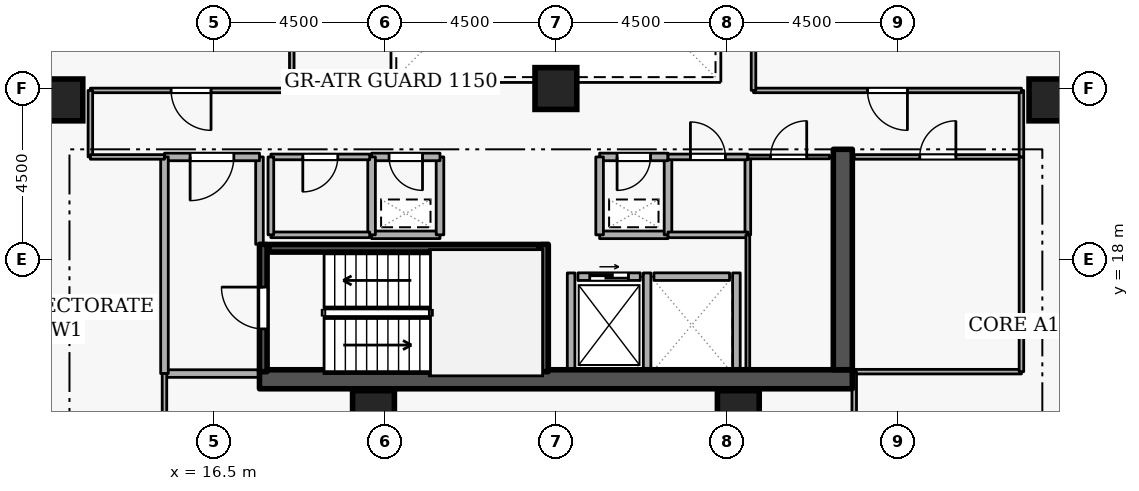
"""IFC4 building model, lengths in metres.
Left out: names, types, materials, properties, quantities, classifications, styles, units other than length and angle.
Written with IfcOpenShell. Run it as: python <this file> out.ifc"""

import sys

from ifc_helpers import new_model, si_unit, direction, frame, frame_2d, origin, origin_2d, place, context, subcontext, project, spatial, rectangle, extrude, element, fill, save


model = new_model("IFC4")
c1 = context("Model", 3, precision=1e-05, world=origin(), true_north=direction((0.0, 1.0)))
c2 = subcontext(c1, "Body", "Model", "MODEL_VIEW")
j1 = project(units=[si_unit("LENGTHUNIT", "METRE"), si_unit("PLANEANGLEUNIT", "RADIAN")], contexts=[c1])
p1 = place(None, origin())
s1 = spatial("IfcSite", under=j1, at=p1, CompositionType="ELEMENT")
p2 = place(p1, origin())
s2 = spatial("IfcBuilding", under=s1, at=p2, CompositionType="ELEMENT")
p3 = place(p2, frame((0.0, 0.0, 152.7)))
s3 = spatial("IfcBuildingStorey", under=s2, at=p3, CompositionType="ELEMENT", Elevation=152.7)
p4 = place(p3, frame((17.7, 14.85, 0.0), z_axis=(0.0, 0.0, 1.0), x_axis=(1.0, 0.0, 0.0)))
e1 = element("IfcWall", 1, at=p4, inside=s3, PredefinedType="SHEAR", context=c2, shape_type="SweptSolid", body=[
    extrude(rectangle(XDim=15.6, YDim=0.5, at=frame_2d((7.8, 0.0))), origin(), (0.0, 0.0, 1.0), 3.6),
])
p5 = place(p3, frame((33.05, 15.1, 0.0), z_axis=(0.0, 0.0, 1.0), x_axis=(0.0, 1.0, 0.0)))
e2 = element("IfcWall", 2, at=p5, inside=s3, PredefinedType="SHEAR", context=c2, shape_type="SweptSolid", body=[
    extrude(rectangle(XDim=5.8, YDim=0.5, at=frame_2d((2.9, 0.0))), origin(), (0.0, 0.0, 1.0), 3.6),
])
for number, where, z_axis, x_axis in (
    (3, (12.5, 22.2, 0.0), (0.0, 0.0, 1.0), (1.0, 0.0, 0.0)),
    (4, (38.5, 22.2, 0.0), (0.0, 0.0, 1.0), (1.0, 0.0, 0.0)),
    (5, (20.7, 14.0, 0.0), (0.0, 0.0, 1.0), (1.0, 0.0, 0.0)),
    (6, (30.3, 14.0, 0.0), (0.0, 0.0, 1.0), (1.0, 0.0, 0.0)),
    (7, (25.5, 22.5, 0.0), (0.0, 0.0, 1.0), (1.0, 0.0, 0.0)),
):
    element("IfcColumn", number, at=place(p3, frame(where, z_axis=z_axis, x_axis=x_axis)), inside=s3, PredefinedType="COLUMN", context=c2, shape_type="SweptSolid", body=[
        extrude(rectangle(XDim=1.1, YDim=1.1, at=origin_2d()), origin(), (0.0, 0.0, 1.0), 3.6),
    ])
p6 = place(p3, frame((26.08, 17.55, 0.0), z_axis=(0.0, 0.0, 1.0), x_axis=(1.0, 0.0, 0.0)))
e8 = element("IfcWall", 8, at=p6, inside=s3, PredefinedType="STANDARD", context=c2, shape_type="SweptSolid", body=[
    extrude(rectangle(XDim=1.64, YDim=0.2, at=frame_2d((0.82, 0.0))), origin(), (0.0, 0.0, 1.0), 3.34),
])
p7 = place(p6, frame((0.31, 0.0, 0.0)))
e9 = element("IfcOpeningElement", 9, at=p7, cuts=e8, PredefinedType="OPENING", context=c2, shape_type="SweptSolid", body=[
    extrude(rectangle(XDim=1.02, YDim=2.06, at=frame_2d((0.51, 1.03))), frame((0.0, 0.11, 0.0), z_axis=(0.0, -1.0, 0.0), x_axis=(1.0, 0.0, 0.0)), (0.0, 0.0, 1.0), 0.22),
])
p8 = place(p3, frame((28.08, 17.55, 0.0), z_axis=(0.0, 0.0, 1.0), x_axis=(1.0, 0.0, 0.0)))
e10 = element("IfcWall", 10, at=p8, inside=s3, PredefinedType="STANDARD", context=c2, shape_type="SweptSolid", body=[
    extrude(rectangle(XDim=1.99, YDim=0.2, at=frame_2d((0.995, 0.0))), origin(), (0.0, 0.0, 1.0), 3.34),
])
for number, where, z_axis, x_axis in (
    (11, (27.9, 15.112, 0.0), (0.0, 0.0, 1.0), (0.0, 1.0, 0.0)),
    (12, (25.9, 15.112, 0.0), (0.0, 0.0, 1.0), (0.0, 1.0, 0.0)),
    (13, (30.25, 15.112, 0.0), (0.0, 0.0, 1.0), (0.0, 1.0, 0.0)),
):
    element("IfcWall", number, at=place(p3, frame(where, z_axis=z_axis, x_axis=x_axis)), inside=s3, PredefinedType="STANDARD", context=c2, shape_type="SweptSolid", body=[
        extrude(rectangle(XDim=2.536, YDim=0.2, at=frame_2d((1.268, 0.0))), origin(), (0.0, 0.0, 1.0), 3.34),
    ])
p9 = place(p3, frame((17.8, 15.05, 0.0), z_axis=(0.0, 0.0, 1.0), x_axis=(0.0, 1.0, 0.0)))
e14 = element("IfcWall", 14, at=p9, inside=s3, PredefinedType="SHEAR", context=c2, shape_type="SweptSolid", body=[
    extrude(rectangle(XDim=3.35, YDim=0.2, at=frame_2d((1.675, 0.0))), origin(), (0.0, 0.0, 1.0), 3.6),
])
p10 = place(p9, frame((1.125, 0.0, 0.0)))
e15 = element("IfcOpeningElement", 15, at=p10, cuts=e14, PredefinedType="OPENING", context=c2, shape_type="SweptSolid", body=[
    extrude(rectangle(XDim=1.1, YDim=2.1, at=frame_2d((0.55, 1.05))), frame((0.0, 0.11, 0.0), z_axis=(0.0, -1.0, 0.0), x_axis=(1.0, 0.0, 0.0)), (0.0, 0.0, 1.0), 0.22),
])
p11 = place(p3, frame((25.2, 18.4, 0.0), z_axis=(0.0, 0.0, 1.0), x_axis=(0.0, -1.0, 0.0)))
e16 = element("IfcWall", 16, at=p11, inside=s3, PredefinedType="SHEAR", context=c2, shape_type="SweptSolid", body=[
    extrude(rectangle(XDim=3.35, YDim=0.2, at=frame_2d((1.675, 0.0))), origin(), (0.0, 0.0, 1.0), 3.6),
])
p12 = place(p3, frame((25.05, 18.297, 0.0), z_axis=(0.0, 0.0, 1.0), x_axis=(-1.0, 0.0, 0.0)))
e17 = element("IfcWall", 17, at=p12, inside=s3, PredefinedType="SHEAR", context=c2, shape_type="SweptSolid", body=[
    extrude(rectangle(XDim=7.1, YDim=0.2, at=frame_2d((3.55, 0.0))), origin(), (0.0, 0.0, 1.0), 3.6),
])
p13 = place(p3, frame((15.2, 15.0, 0.0), z_axis=(0.0, 0.0, 1.0), x_axis=(1.0, 0.0, 0.0)))
e18 = element("IfcWall", 18, at=p13, inside=s3, PredefinedType="STANDARD", context=c2, shape_type="SweptSolid", body=[
    extrude(rectangle(XDim=2.5, YDim=0.2, at=frame_2d((1.25, 0.0))), origin(), (0.0, 0.0, 1.0), 3.34),
])
p14 = place(p3, frame((17.7, 18.4, 0.0), z_axis=(0.0, 0.0, 1.0), x_axis=(0.0, 1.0, 0.0)))
e19 = element("IfcWall", 19, at=p14, inside=s3, PredefinedType="STANDARD", context=c2, shape_type="SweptSolid", body=[
    extrude(rectangle(XDim=2.3, YDim=0.2, at=frame_2d((1.15, 0.0))), origin(), (0.0, 0.0, 1.0), 2.545),
])
p15 = place(p3, frame((17.7, 20.7, 0.0), z_axis=(0.0, 0.0, 1.0), x_axis=(-1.0, 0.0, 0.0)))
e20 = element("IfcWall", 20, at=p15, inside=s3, PredefinedType="STANDARD", context=c2, shape_type="SweptSolid", body=[
    extrude(rectangle(XDim=2.5, YDim=0.2, at=frame_2d((1.25, 0.0))), origin(), (0.0, 0.0, 1.0), 3.34),
])
p16 = place(p15, frame((0.675, 0.0, 0.0)))
e21 = element("IfcOpeningElement", 21, at=p16, cuts=e20, PredefinedType="OPENING", context=c2, shape_type="SweptSolid", body=[
    extrude(rectangle(XDim=1.15, YDim=2.1, at=frame_2d((0.575, 1.05))), frame((0.0, 0.11, 0.0), z_axis=(0.0, -1.0, 0.0), x_axis=(1.0, 0.0, 0.0)), (0.0, 0.0, 1.0), 0.22),
])
p17 = place(p3, frame((15.2, 20.7, 0.0), z_axis=(0.0, 0.0, 1.0), x_axis=(0.0, -1.0, 0.0)))
e22 = element("IfcWall", 22, at=p17, inside=s3, PredefinedType="STANDARD", context=c2, shape_type="SweptSolid", body=[
    extrude(rectangle(XDim=5.7, YDim=0.2, at=frame_2d((2.85, 0.0))), origin(), (0.0, 0.0, 1.0), 3.34),
])
p18 = place(p3, frame((26.65, 18.65, 0.0), z_axis=(0.0, 0.0, 1.0), x_axis=(1.0, 0.0, 0.0)))
e23 = element("IfcWall", 23, at=p18, inside=s3, PredefinedType="STANDARD", context=c2, shape_type="SweptSolid", body=[
    extrude(rectangle(XDim=1.8, YDim=0.2, at=frame_2d((0.9, 0.0))), origin(), (0.0, 0.0, 1.0), 3.34),
])
p19 = place(p3, frame((28.45, 18.65, 0.0), z_axis=(0.0, 0.0, 1.0), x_axis=(0.0, 1.0, 0.0)))
e24 = element("IfcWall", 24, at=p19, inside=s3, PredefinedType="STANDARD", context=c2, shape_type="SweptSolid", body=[
    extrude(rectangle(XDim=2.05, YDim=0.2, at=frame_2d((1.025, 0.0))), origin(), (0.0, 0.0, 1.0), 3.34),
])
p20 = place(p3, frame((28.45, 20.7, 0.0), z_axis=(0.0, 0.0, 1.0), x_axis=(-1.0, 0.0, 0.0)))
e25 = element("IfcWall", 25, at=p20, inside=s3, PredefinedType="STANDARD", context=c2, shape_type="SweptSolid", body=[
    extrude(rectangle(XDim=1.8, YDim=0.2, at=frame_2d((0.9, 0.0))), origin(), (0.0, 0.0, 1.0), 3.34),
])
p21 = place(p20, frame((0.46, 0.0, 0.0)))
e26 = element("IfcOpeningElement", 26, at=p21, cuts=e25, PredefinedType="OPENING", context=c2, shape_type="SweptSolid", body=[
    extrude(rectangle(XDim=0.88, YDim=2.04, at=frame_2d((0.44, 1.02))), frame((0.0, 0.11, 0.0), z_axis=(0.0, -1.0, 0.0), x_axis=(1.0, 0.0, 0.0)), (0.0, 0.0, 1.0), 0.22),
])
p22 = place(p3, frame((26.65, 20.7, 0.0), z_axis=(0.0, 0.0, 1.0), x_axis=(0.0, -1.0, 0.0)))
e27 = element("IfcWall", 27, at=p22, inside=s3, PredefinedType="STANDARD", context=c2, shape_type="SweptSolid", body=[
    extrude(rectangle(XDim=2.05, YDim=0.2, at=frame_2d((1.025, 0.0))), origin(), (0.0, 0.0, 1.0), 3.34),
])
p23 = place(p3, frame((20.65, 18.65, 0.0), z_axis=(0.0, 0.0, 1.0), x_axis=(1.0, 0.0, 0.0)))
e28 = element("IfcWall", 28, at=p23, inside=s3, PredefinedType="STANDARD", context=c2, shape_type="SweptSolid", body=[
    extrude(rectangle(XDim=1.8, YDim=0.2, at=frame_2d((0.9, 0.0))), origin(), (0.0, 0.0, 1.0), 3.34),
])
p24 = place(p3, frame((22.45, 18.65, 0.0), z_axis=(0.0, 0.0, 1.0), x_axis=(0.0, 1.0, 0.0)))
e29 = element("IfcWall", 29, at=p24, inside=s3, PredefinedType="STANDARD", context=c2, shape_type="SweptSolid", body=[
    extrude(rectangle(XDim=2.05, YDim=0.2, at=frame_2d((1.025, 0.0))), origin(), (0.0, 0.0, 1.0), 3.34),
])
p25 = place(p3, frame((22.45, 20.7, 0.0), z_axis=(0.0, 0.0, 1.0), x_axis=(-1.0, 0.0, 0.0)))
e30 = element("IfcWall", 30, at=p25, inside=s3, PredefinedType="STANDARD", context=c2, shape_type="SweptSolid", body=[
    extrude(rectangle(XDim=1.8, YDim=0.2, at=frame_2d((0.9, 0.0))), origin(), (0.0, 0.0, 1.0), 3.34),
])
p26 = place(p25, frame((0.46, 0.0, 0.0)))
e31 = element("IfcOpeningElement", 31, at=p26, cuts=e30, PredefinedType="OPENING", context=c2, shape_type="SweptSolid", body=[
    extrude(rectangle(XDim=0.88, YDim=2.04, at=frame_2d((0.44, 1.02))), frame((0.0, 0.11, 0.0), z_axis=(0.0, -1.0, 0.0), x_axis=(1.0, 0.0, 0.0)), (0.0, 0.0, 1.0), 0.22),
])
p27 = place(p3, frame((20.65, 20.7, 0.0), z_axis=(0.0, 0.0, 1.0), x_axis=(0.0, -1.0, 0.0)))
e32 = element("IfcWall", 32, at=p27, inside=s3, PredefinedType="STANDARD", context=c2, shape_type="SweptSolid", body=[
    extrude(rectangle(XDim=2.05, YDim=0.2, at=frame_2d((1.025, 0.0))), origin(), (0.0, 0.0, 1.0), 3.34),
])
p28 = place(p3, frame((18.0, 18.65, 0.0), z_axis=(0.0, 0.0, 1.0), x_axis=(1.0, 0.0, 0.0)))
e33 = element("IfcWall", 33, at=p28, inside=s3, PredefinedType="PARTITIONING", context=c2, shape_type="SweptSolid", body=[
    extrude(rectangle(XDim=2.6, YDim=0.15, at=frame_2d((1.3, 0.0))), origin(), (0.0, 0.0, 1.0), 3.34),
])
p29 = place(p3, frame((20.6, 20.7, 0.0), z_axis=(0.0, 0.0, 1.0), x_axis=(-1.0, 0.0, 0.0)))
e34 = element("IfcWall", 34, at=p29, inside=s3, PredefinedType="PARTITIONING", context=c2, shape_type="SweptSolid", body=[
    extrude(rectangle(XDim=2.6, YDim=0.15, at=frame_2d((1.3, 0.0))), origin(), (0.0, 0.0, 1.0), 3.34),
])
p30 = place(p29, frame((0.84, 0.0, 0.0)))
e35 = element("IfcOpeningElement", 35, at=p30, cuts=e34, PredefinedType="OPENING", context=c2, shape_type="SweptSolid", body=[
    extrude(rectangle(XDim=0.92, YDim=2.08, at=frame_2d((0.46, 1.04))), frame((0.0, 0.085, 0.0), z_axis=(0.0, -1.0, 0.0), x_axis=(1.0, 0.0, 0.0)), (0.0, 0.0, 1.0), 0.17),
])
p31 = place(p3, frame((18.0, 20.7, 0.0), z_axis=(0.0, 0.0, 1.0), x_axis=(0.0, -1.0, 0.0)))
e36 = element("IfcWall", 36, at=p31, inside=s3, PredefinedType="PARTITIONING", context=c2, shape_type="SweptSolid", body=[
    extrude(rectangle(XDim=2.05, YDim=0.15, at=frame_2d((1.025, 0.0))), origin(), (0.0, 0.0, 1.0), 2.545),
])
p32 = place(p3, frame((30.55, 20.7, 0.0), z_axis=(0.0, 0.0, 1.0), x_axis=(0.0, -1.0, 0.0)))
e37 = element("IfcWall", 37, at=p32, inside=s3, PredefinedType="PARTITIONING", context=c2, shape_type="SweptSolid", body=[
    extrude(rectangle(XDim=2.05, YDim=0.15, at=frame_2d((1.025, 0.0))), origin(), (0.0, 0.0, 1.0), 3.34),
])
p33 = place(p3, frame((30.55, 18.65, 0.0), z_axis=(0.0, 0.0, 1.0), x_axis=(-1.0, 0.0, 0.0)))
e38 = element("IfcWall", 38, at=p33, inside=s3, PredefinedType="PARTITIONING", context=c2, shape_type="SweptSolid", body=[
    extrude(rectangle(XDim=2.1, YDim=0.15, at=frame_2d((1.05, 0.0))), origin(), (0.0, 0.0, 1.0), 3.34),
])
p34 = place(p3, frame((28.45, 20.7, 0.0), z_axis=(0.0, 0.0, 1.0), x_axis=(1.0, 0.0, 0.0)))
e39 = element("IfcWall", 39, at=p34, inside=s3, PredefinedType="PARTITIONING", context=c2, shape_type="SweptSolid", body=[
    extrude(rectangle(XDim=2.1, YDim=0.15, at=frame_2d((1.05, 0.0))), origin(), (0.0, 0.0, 1.0), 3.34),
])
p35 = place(p34, frame((0.59, 0.0, 0.0)))
e40 = element("IfcOpeningElement", 40, at=p35, cuts=e39, PredefinedType="OPENING", context=c2, shape_type="SweptSolid", body=[
    extrude(rectangle(XDim=0.92, YDim=2.08, at=frame_2d((0.46, 1.04))), frame((0.0, 0.085, 0.0), z_axis=(0.0, -1.0, 0.0), x_axis=(1.0, 0.0, 0.0)), (0.0, 0.0, 1.0), 0.17),
])
p36 = place(p3, frame((30.55, 15.1, 0.0), z_axis=(0.0, 0.0, 1.0), x_axis=(0.0, 1.0, 0.0)))
e41 = element("IfcWall", 41, at=p36, inside=s3, PredefinedType="PARTITIONING", context=c2, shape_type="SweptSolid", body=[
    extrude(rectangle(XDim=3.55, YDim=0.1, at=frame_2d((1.775, 0.0))), origin(), (0.0, 0.0, 1.0), 3.34),
])
p37 = place(p3, frame((30.55, 20.7, 0.0), z_axis=(0.0, 0.0, 1.0), x_axis=(1.0, 0.0, 0.0)))
e42 = element("IfcWall", 42, at=p37, inside=s3, PredefinedType="PARTITIONING", context=c2, shape_type="SweptSolid", body=[
    extrude(rectangle(XDim=2.15, YDim=0.1, at=frame_2d((1.075, 0.0))), origin(), (0.0, 0.0, 1.0), 3.34),
])
p38 = place(p37, frame((0.6, 0.0, 0.0)))
e43 = element("IfcOpeningElement", 43, at=p38, cuts=e42, PredefinedType="OPENING", context=c2, shape_type="SweptSolid", body=[
    extrude(rectangle(XDim=0.95, YDim=2.1, at=frame_2d((0.475, 1.05))), frame((0.0, 0.06, 0.0), z_axis=(0.0, -1.0, 0.0), x_axis=(1.0, 0.0, 0.0)), (0.0, 0.0, 1.0), 0.12),
])
p39 = place(p3, frame((37.75, 15.05, 0.0), z_axis=(0.0, 0.0, 1.0), x_axis=(-1.0, 0.0, 0.0)))
e44 = element("IfcWall", 44, at=p39, inside=s3, PredefinedType="PARTITIONING", context=c2, shape_type="SweptSolid", body=[
    extrude(rectangle(XDim=4.4, YDim=0.12, at=frame_2d((2.2, 0.0))), origin(), (0.0, 0.0, 1.0), 3.34),
])
p40 = place(p3, frame((33.35, 20.7, 0.0), z_axis=(0.0, 0.0, 1.0), x_axis=(1.0, 0.0, 0.0)))
e45 = element("IfcWall", 45, at=p40, inside=s3, PredefinedType="PARTITIONING", context=c2, shape_type="SweptSolid", body=[
    extrude(rectangle(XDim=4.4, YDim=0.12, at=frame_2d((2.2, 0.0))), origin(), (0.0, 0.0, 1.0), 3.34),
])
p41 = place(p40, frame((1.725, 0.0, 0.0)))
e46 = element("IfcOpeningElement", 46, at=p41, cuts=e45, PredefinedType="OPENING", context=c2, shape_type="SweptSolid", body=[
    extrude(rectangle(XDim=0.95, YDim=2.1, at=frame_2d((0.475, 1.05))), frame((0.0, 0.07, 0.0), z_axis=(0.0, -1.0, 0.0), x_axis=(1.0, 0.0, 0.0)), (0.0, 0.0, 1.0), 0.14),
])
p42 = place(p3, frame((37.75, 20.7, 0.0), z_axis=(0.0, 0.0, 1.0), x_axis=(0.0, -1.0, 0.0)))
e47 = element("IfcWall", 47, at=p42, inside=s3, PredefinedType="PARTITIONING", context=c2, shape_type="SweptSolid", body=[
    extrude(rectangle(XDim=5.65, YDim=0.12, at=frame_2d((2.825, 0.0))), origin(), (0.0, 0.0, 1.0), 3.34),
])
p43 = place(p3, frame((18.55, 27.0, 0.0), z_axis=(0.0, 0.0, 1.0), x_axis=(0.0, -1.0, 0.0)))
e48 = element("IfcWall", 48, at=p43, inside=s3, PredefinedType="PARTITIONING", context=c2, shape_type="SweptSolid", body=[
    extrude(rectangle(XDim=4.55, YDim=0.12, at=frame_2d((2.275, 0.0))), origin(), (0.0, 0.0, 1.0), 3.34),
])
p44 = place(p3, frame((18.55, 22.45, 0.0), z_axis=(0.0, 0.0, 1.0), x_axis=(-1.0, 0.0, 0.0)))
e49 = element("IfcWall", 49, at=p44, inside=s3, PredefinedType="PARTITIONING", context=c2, shape_type="SweptSolid", body=[
    extrude(rectangle(XDim=5.3, YDim=0.12, at=frame_2d((2.65, 0.0))), origin(), (0.0, 0.0, 1.0), 3.34),
])
p45 = place(p44, frame((2.125, 0.0, 0.0)))
e50 = element("IfcOpeningElement", 50, at=p45, cuts=e49, PredefinedType="OPENING", context=c2, shape_type="SweptSolid", body=[
    extrude(rectangle(XDim=1.05, YDim=2.1, at=frame_2d((0.525, 1.05))), frame((0.0, 0.07, 0.0), z_axis=(0.0, -1.0, 0.0), x_axis=(1.0, 0.0, 0.0)), (0.0, 0.0, 1.0), 0.14),
])
p46 = place(p3, frame((13.25, 22.45, 0.0), z_axis=(0.0, 0.0, 1.0), x_axis=(0.0, -1.0, 0.0)))
e51 = element("IfcWall", 51, at=p46, inside=s3, PredefinedType="PARTITIONING", context=c2, shape_type="SweptSolid", body=[
    extrude(rectangle(XDim=1.75, YDim=0.12, at=frame_2d((0.875, 0.0))), origin(), (0.0, 0.0, 1.0), 3.34),
])
p47 = place(p3, frame((13.25, 20.7, 0.0), z_axis=(0.0, 0.0, 1.0), x_axis=(1.0, 0.0, 0.0)))
e52 = element("IfcWall", 52, at=p47, inside=s3, PredefinedType="PARTITIONING", context=c2, shape_type="SweptSolid", body=[
    extrude(rectangle(XDim=1.95, YDim=0.12, at=frame_2d((0.975, 0.0))), origin(), (0.0, 0.0, 1.0), 3.34),
])
p48 = place(p3, frame((15.2, 15.0, 0.0), z_axis=(0.0, 0.0, 1.0), x_axis=(0.0, -1.0, 0.0)))
e53 = element("IfcWall", 53, at=p48, inside=s3, PredefinedType="PARTITIONING", context=c2, shape_type="SweptSolid", body=[
    extrude(rectangle(XDim=11.72, YDim=0.12, at=frame_2d((5.86, 0.0))), origin(), (0.0, 0.0, 1.0), 3.34),
])
p49 = place(p3, frame((33.35, 3.28, 0.0), z_axis=(0.0, 0.0, 1.0), x_axis=(0.0, 1.0, 0.0)))
e54 = element("IfcWall", 54, at=p49, inside=s3, PredefinedType="PARTITIONING", context=c2, shape_type="SweptSolid", body=[
    extrude(rectangle(XDim=11.77, YDim=0.12, at=frame_2d((5.885, 0.0))), origin(), (0.0, 0.0, 1.0), 2.545),
])
p50 = place(p3, frame((37.75, 20.7, 0.0), z_axis=(0.0, 0.0, 1.0), x_axis=(0.0, 1.0, 0.0)))
e55 = element("IfcWall", 55, at=p50, inside=s3, PredefinedType="PARTITIONING", context=c2, shape_type="SweptSolid", body=[
    extrude(rectangle(XDim=1.75, YDim=0.12, at=frame_2d((0.875, 0.0))), origin(), (0.0, 0.0, 1.0), 3.34),
])
p51 = place(p3, frame((37.75, 22.45, 0.0), z_axis=(0.0, 0.0, 1.0), x_axis=(-1.0, 0.0, 0.0)))
e56 = element("IfcWall", 56, at=p51, inside=s3, PredefinedType="PARTITIONING", context=c2, shape_type="SweptSolid", body=[
    extrude(rectangle(XDim=7.05, YDim=0.12, at=frame_2d((3.525, 0.0))), origin(), (0.0, 0.0, 1.0), 3.34),
])
p52 = place(p51, frame((3.0, 0.0, 0.0)))
e57 = element("IfcOpeningElement", 57, at=p52, cuts=e56, PredefinedType="OPENING", context=c2, shape_type="SweptSolid", body=[
    extrude(rectangle(XDim=1.05, YDim=2.1, at=frame_2d((0.525, 1.05))), frame((0.0, 0.07, 0.0), z_axis=(0.0, -1.0, 0.0), x_axis=(1.0, 0.0, 0.0)), (0.0, 0.0, 1.0), 0.14),
])
p53 = place(p3, frame((30.7, 22.45, 0.0), z_axis=(0.0, 0.0, 1.0), x_axis=(0.0, 1.0, 0.0)))
e58 = element("IfcWall", 58, at=p53, inside=s3, PredefinedType="PARTITIONING", context=c2, shape_type="SweptSolid", body=[
    extrude(rectangle(XDim=4.55, YDim=0.12, at=frame_2d((2.275, 0.0))), origin(), (0.0, 0.0, 1.0), 3.34),
])
p54 = place(p7, origin())
e59 = element("IfcDoor", 59, at=p54, inside=s3, OperationType="SLIDING_TO_LEFT", PredefinedType="DOOR", context=c2, shape_type="SweptSolid", body=[
    extrude(rectangle(XDim=1.02, YDim=2.06, at=frame_2d((0.51, 1.03))), frame((0.0, 0.025, 0.0), z_axis=(0.0, -1.0, 0.0), x_axis=(1.0, 0.0, 0.0)), (0.0, 0.0, 1.0), 0.05),
])
fill(e9, e59)
p55 = place(p10, origin())
e60 = element("IfcDoor", 60, at=p55, inside=s3, OperationType="SINGLE_SWING_RIGHT", PredefinedType="DOOR", context=c2, shape_type="SweptSolid", body=[
    extrude(rectangle(XDim=1.1, YDim=2.1, at=frame_2d((0.55, 1.05))), frame((0.0, 0.025, 0.0), z_axis=(0.0, -1.0, 0.0), x_axis=(1.0, 0.0, 0.0)), (0.0, 0.0, 1.0), 0.05),
])
fill(e15, e60)
p56 = place(p16, origin())
e61 = element("IfcDoor", 61, at=p56, inside=s3, OperationType="SINGLE_SWING_RIGHT", PredefinedType="DOOR", context=c2, shape_type="SweptSolid", body=[
    extrude(rectangle(XDim=1.15, YDim=2.1, at=frame_2d((0.575, 1.05))), frame((0.0, 0.025, 0.0), z_axis=(0.0, -1.0, 0.0), x_axis=(1.0, 0.0, 0.0)), (0.0, 0.0, 1.0), 0.05),
])
fill(e21, e61)
p57 = place(p21, origin())
e62 = element("IfcDoor", 62, at=p57, inside=s3, OperationType="SINGLE_SWING_RIGHT", PredefinedType="DOOR", context=c2, shape_type="SweptSolid", body=[
    extrude(rectangle(XDim=0.88, YDim=2.04, at=frame_2d((0.44, 1.02))), frame((0.0, 0.025, 0.0), z_axis=(0.0, -1.0, 0.0), x_axis=(1.0, 0.0, 0.0)), (0.0, 0.0, 1.0), 0.05),
])
fill(e26, e62)
p58 = place(p26, origin())
e63 = element("IfcDoor", 63, at=p58, inside=s3, OperationType="SINGLE_SWING_LEFT", PredefinedType="DOOR", context=c2, shape_type="SweptSolid", body=[
    extrude(rectangle(XDim=0.88, YDim=2.04, at=frame_2d((0.44, 1.02))), frame((0.0, 0.025, 0.0), z_axis=(0.0, -1.0, 0.0), x_axis=(1.0, 0.0, 0.0)), (0.0, 0.0, 1.0), 0.05),
])
fill(e31, e63)
p59 = place(p30, origin())
e64 = element("IfcDoor", 64, at=p59, inside=s3, OperationType="SINGLE_SWING_RIGHT", PredefinedType="DOOR", context=c2, shape_type="SweptSolid", body=[
    extrude(rectangle(XDim=0.92, YDim=2.08, at=frame_2d((0.46, 1.04))), frame((0.0, 0.025, 0.0), z_axis=(0.0, -1.0, 0.0), x_axis=(1.0, 0.0, 0.0)), (0.0, 0.0, 1.0), 0.05),
])
fill(e35, e64)
p60 = place(p35, origin())
e65 = element("IfcDoor", 65, at=p60, inside=s3, OperationType="SINGLE_SWING_LEFT", PredefinedType="DOOR", context=c2, shape_type="SweptSolid", body=[
    extrude(rectangle(XDim=0.92, YDim=2.08, at=frame_2d((0.46, 1.04))), frame((0.0, 0.025, 0.0), z_axis=(0.0, -1.0, 0.0), x_axis=(1.0, 0.0, 0.0)), (0.0, 0.0, 1.0), 0.05),
])
fill(e40, e65)
p61 = place(p38, origin())
e66 = element("IfcDoor", 66, at=p61, inside=s3, OperationType="SINGLE_SWING_RIGHT", PredefinedType="DOOR", context=c2, shape_type="SweptSolid", body=[
    extrude(rectangle(XDim=0.95, YDim=2.1, at=frame_2d((0.475, 1.05))), frame((0.0, 0.025, 0.0), z_axis=(0.0, -1.0, 0.0), x_axis=(1.0, 0.0, 0.0)), (0.0, 0.0, 1.0), 0.05),
])
fill(e43, e66)
p62 = place(p41, origin())
e67 = element("IfcDoor", 67, at=p62, inside=s3, OperationType="SINGLE_SWING_RIGHT", PredefinedType="DOOR", context=c2, shape_type="SweptSolid", body=[
    extrude(rectangle(XDim=0.95, YDim=2.1, at=frame_2d((0.475, 1.05))), frame((0.0, 0.025, 0.0), z_axis=(0.0, -1.0, 0.0), x_axis=(1.0, 0.0, 0.0)), (0.0, 0.0, 1.0), 0.05),
])
fill(e46, e67)
p63 = place(p45, origin())
e68 = element("IfcDoor", 68, at=p63, inside=s3, OperationType="SINGLE_SWING_LEFT", PredefinedType="DOOR", context=c2, shape_type="SweptSolid", body=[
    extrude(rectangle(XDim=1.05, YDim=2.1, at=frame_2d((0.525, 1.05))), frame((0.0, 0.025, 0.0), z_axis=(0.0, -1.0, 0.0), x_axis=(1.0, 0.0, 0.0)), (0.0, 0.0, 1.0), 0.05),
])
fill(e50, e68)
p64 = place(p52, origin())
e69 = element("IfcDoor", 69, at=p64, inside=s3, OperationType="SINGLE_SWING_LEFT", PredefinedType="DOOR", context=c2, shape_type="SweptSolid", body=[
    extrude(rectangle(XDim=1.05, YDim=2.1, at=frame_2d((0.525, 1.05))), frame((0.0, 0.025, 0.0), z_axis=(0.0, -1.0, 0.0), x_axis=(1.0, 0.0, 0.0)), (0.0, 0.0, 1.0), 0.05),
])
fill(e57, e69)
save(model, sys.argv[1])
